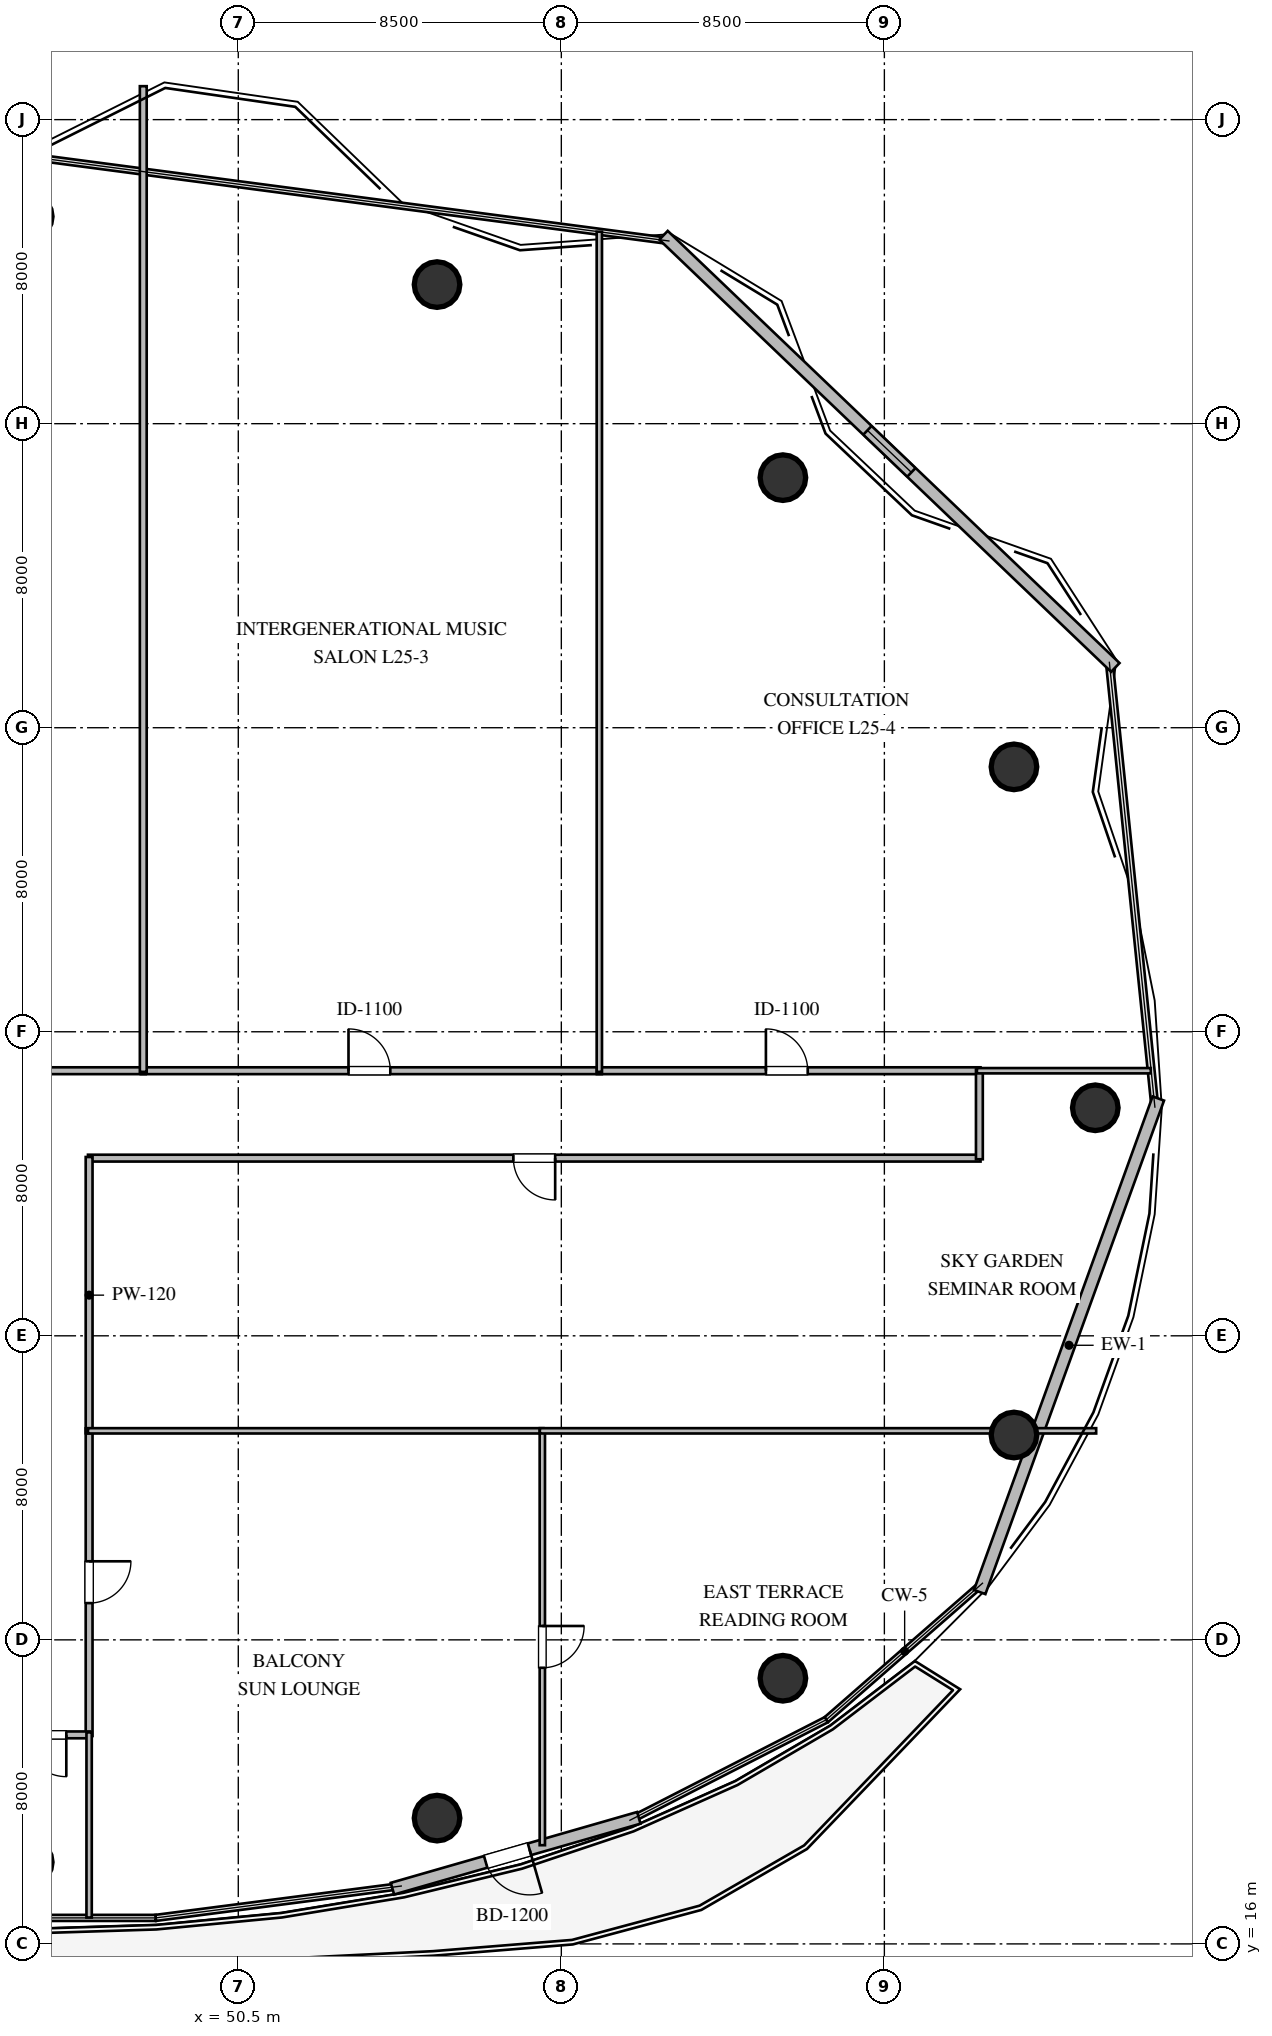
"""IFC4 building model, lengths in metres.
Left out: names, types, materials, properties, quantities, classifications, styles, units other than length and angle.
Written with IfcOpenShell. Run it as: python <this file> out.ifc"""

import sys

from ifc_helpers import new_model, si_unit, direction, frame, frame_2d, origin, origin_2d, place, context, subcontext, project, spatial, rectangle, circle, extrude, element, fill, save


model = new_model("IFC4")
c1 = context("Model", 3, precision=1e-05, world=origin(), true_north=direction((0.0, 1.0)))
c2 = subcontext(c1, "Body", "Model", "MODEL_VIEW")
j1 = project(units=[si_unit("LENGTHUNIT", "METRE"), si_unit("PLANEANGLEUNIT", "RADIAN")], contexts=[c1])
p1 = place(None, origin())
s1 = spatial("IfcSite", under=j1, at=p1, CompositionType="ELEMENT")
p2 = place(p1, origin())
s2 = spatial("IfcBuilding", under=s1, at=p2, CompositionType="ELEMENT")
p3 = place(p2, frame((0.0, 0.0, 97.8)))
s3 = spatial("IfcBuildingStorey", under=s2, at=p3, CompositionType="ELEMENT", Elevation=97.8)
for number, where, z_axis, x_axis in (
    (1, (73.05, 38.0, -0.32), (0.0, 0.0, 1.0), (1.0, 0.0, 0.0)),
    (2, (70.91, 46.97, -0.32), (0.0, 0.0, 1.0), (1.0, 0.0, 0.0)),
    (3, (64.83, 54.58, -0.32), (0.0, 0.0, 1.0), (1.0, 0.0, 0.0)),
    (4, (55.73, 59.66, -0.32), (0.0, 0.0, 1.0), (1.0, 0.0, 0.0)),
    (5, (55.73, 19.31, -0.32), (0.0, 0.0, 1.0), (1.0, 0.0, 0.0)),
    (6, (64.83, 22.99, -0.32), (0.0, 0.0, 1.0), (1.0, 0.0, 0.0)),
    (7, (70.91, 29.39, -0.32), (0.0, 0.0, 1.0), (1.0, 0.0, 0.0)),
):
    element("IfcColumn", number, at=place(p3, frame(where, z_axis=z_axis, x_axis=x_axis)), inside=s3, PredefinedType="COLUMN", context=c2, shape_type="SweptSolid", body=[
        extrude(circle(Radius=0.6, at=origin_2d()), origin(), (0.0, 0.0, 1.0), 5.12),
    ])
p4 = place(p3, frame((74.708, 38.244, 0.0), z_axis=(0.0, 0.0, 1.0), x_axis=(-0.340324669139, -0.94030799187, 0.0)))
e8 = element("IfcWall", 8, at=p4, inside=s3, PredefinedType="STANDARD", context=c2, shape_type="SweptSolid", body=[
    extrude(rectangle(XDim=13.81, YDim=0.32, at=frame_2d((6.905, 0.0))), origin(), (0.0, 0.0, 1.0), 4.56),
])
p5 = place(p3, frame((61.039, 19.317, 0.0), z_axis=(0.0, 0.0, 1.0), x_axis=(-0.96106509915, -0.276322049784, 0.0)))
e9 = element("IfcWall", 9, at=p5, inside=s3, PredefinedType="STANDARD", context=c2, shape_type="SweptSolid", body=[
    extrude(rectangle(XDim=6.746, YDim=0.32, at=frame_2d((3.373, 0.0))), origin(), (0.0, 0.0, 1.0), 4.56),
])
p6 = place(p5, frame((2.993, 0.0, 0.0)))
e10 = element("IfcOpeningElement", 10, at=p6, cuts=e9, PredefinedType="OPENING", context=c2, shape_type="SweptSolid", body=[
    extrude(rectangle(XDim=1.2, YDim=2.15, at=frame_2d((0.6, 1.075))), frame((0.0, 0.17, 0.0), z_axis=(0.0, -1.0, 0.0), x_axis=(1.0, 0.0, 0.0)), (0.0, 0.0, 1.0), 0.34),
])
p7 = place(p3, frame((61.689, 60.957, 0.0), z_axis=(0.0, 0.0, 1.0), x_axis=(0.722641212534, -0.691223319881, 0.0)))
e11 = element("IfcWall", 11, at=p7, inside=s3, PredefinedType="STANDARD", context=c2, shape_type="SweptSolid", body=[
    extrude(rectangle(XDim=16.451, YDim=0.32, at=frame_2d((8.225, 0.0))), origin(), (0.0, 0.0, 1.0), 4.56),
])
p8 = place(p7, frame((7.425, 0.0, 1.05)))
e12 = element("IfcOpeningElement", 12, at=p8, cuts=e11, PredefinedType="OPENING", context=c2, shape_type="SweptSolid", body=[
    extrude(rectangle(XDim=1.6, YDim=1.5, at=frame_2d((0.8, 0.75))), frame((0.0, 0.17, 0.0), z_axis=(0.0, -1.0, 0.0), x_axis=(1.0, 0.0, 0.0)), (0.0, 0.0, 1.0), 0.34),
])
p9 = place(p3, frame((34.935, 38.975, 0.0), z_axis=(0.0, 0.0, 1.0), x_axis=(1.0, 0.0, 0.0)))
e13 = element("IfcWall", 13, at=p9, inside=s3, PredefinedType="PARTITIONING", context=c2, shape_type="SweptSolid", body=[
    extrude(rectangle(XDim=13.13, YDim=0.18, at=frame_2d((6.565, 0.0))), origin(), (0.0, 0.0, 1.0), 4.56),
])
p10 = place(p9, frame((5.965, 0.0, 0.0)))
e14 = element("IfcOpeningElement", 14, at=p10, cuts=e13, PredefinedType="OPENING", context=c2, shape_type="SweptSolid", body=[
    extrude(rectangle(XDim=1.4, YDim=2.15, at=frame_2d((0.7, 1.075))), frame((0.0, 0.1, 0.0), z_axis=(0.0, -1.0, 0.0), x_axis=(1.0, 0.0, 0.0)), (0.0, 0.0, 1.0), 0.2),
])
p11 = place(p3, frame((47.935, 38.975, 0.0), z_axis=(0.0, 0.0, 1.0), x_axis=(1.0, 0.0, 0.0)))
e15 = element("IfcWall", 15, at=p11, inside=s3, PredefinedType="PARTITIONING", context=c2, shape_type="SweptSolid", body=[
    extrude(rectangle(XDim=12.13, YDim=0.18, at=frame_2d((6.065, 0.0))), origin(), (0.0, 0.0, 1.0), 4.56),
])
p12 = place(p11, frame((5.465, 0.0, 0.0)))
e16 = element("IfcOpeningElement", 16, at=p12, cuts=e15, PredefinedType="OPENING", context=c2, shape_type="SweptSolid", body=[
    extrude(rectangle(XDim=1.1, YDim=2.1, at=frame_2d((0.55, 1.05))), frame((0.0, 0.1, 0.0), z_axis=(0.0, -1.0, 0.0), x_axis=(1.0, 0.0, 0.0)), (0.0, 0.0, 1.0), 0.2),
])
p13 = place(p3, frame((59.935, 38.975, 0.0), z_axis=(0.0, 0.0, 1.0), x_axis=(1.0, 0.0, 0.0)))
e17 = element("IfcWall", 17, at=p13, inside=s3, PredefinedType="PARTITIONING", context=c2, shape_type="SweptSolid", body=[
    extrude(rectangle(XDim=10.095, YDim=0.18, at=frame_2d((5.047, 0.0))), origin(), (0.0, 0.0, 1.0), 4.56),
])
p14 = place(p13, frame((4.448, 0.0, 0.0)))
e18 = element("IfcOpeningElement", 18, at=p14, cuts=e17, PredefinedType="OPENING", context=c2, shape_type="SweptSolid", body=[
    extrude(rectangle(XDim=1.1, YDim=2.1, at=frame_2d((0.55, 1.05))), frame((0.0, 0.1, 0.0), z_axis=(0.0, -1.0, 0.0), x_axis=(1.0, 0.0, 0.0)), (0.0, 0.0, 1.0), 0.2),
])
p15 = place(p3, frame((46.575, 29.565, 0.0), z_axis=(0.0, 0.0, 1.0), x_axis=(0.0, -1.0, 0.0)))
e19 = element("IfcWall", 19, at=p15, inside=s3, PredefinedType="PARTITIONING", context=c2, shape_type="SweptSolid", body=[
    extrude(rectangle(XDim=8.095, YDim=0.18, at=frame_2d((4.047, 0.0))), origin(), (0.0, 0.0, 1.0), 4.56),
])
p16 = place(p15, frame((3.498, 0.0, 0.0)))
e20 = element("IfcOpeningElement", 20, at=p16, cuts=e19, PredefinedType="OPENING", context=c2, shape_type="SweptSolid", body=[
    extrude(rectangle(XDim=1.1, YDim=2.1, at=frame_2d((0.55, 1.05))), frame((0.0, 0.1, 0.0), z_axis=(0.0, -1.0, 0.0), x_axis=(1.0, 0.0, 0.0)), (0.0, 0.0, 1.0), 0.2),
])
p17 = place(p3, frame((70.03, 36.675, 0.0), z_axis=(0.0, 0.0, 1.0), x_axis=(-1.0, 0.0, 0.0)))
e21 = element("IfcWall", 21, at=p17, inside=s3, PredefinedType="PARTITIONING", context=c2, shape_type="SweptSolid", body=[
    extrude(rectangle(XDim=23.485, YDim=0.18, at=frame_2d((11.743, 0.0))), origin(), (0.0, 0.0, 1.0), 4.09),
])
p18 = place(p17, frame((11.192, 0.0, 0.0)))
e22 = element("IfcOpeningElement", 22, at=p18, cuts=e21, PredefinedType="OPENING", context=c2, shape_type="SweptSolid", body=[
    extrude(rectangle(XDim=1.1, YDim=2.1, at=frame_2d((0.55, 1.05))), frame((0.0, 0.1, 0.0), z_axis=(0.0, -1.0, 0.0), x_axis=(1.0, 0.0, 0.0)), (0.0, 0.0, 1.0), 0.2),
])
p19 = place(p3, frame((46.575, 36.705, 0.0), z_axis=(0.0, 0.0, 1.0), x_axis=(0.0, -1.0, 0.0)))
e23 = element("IfcWall", 23, at=p19, inside=s3, PredefinedType="PARTITIONING", context=c2, shape_type="SweptSolid", body=[
    extrude(rectangle(XDim=7.27, YDim=0.18, at=frame_2d((3.635, 0.0))), origin(), (0.0, 0.0, 1.0), 4.56),
])
p20 = place(p3, frame((70.0, 39.005, 0.0), z_axis=(0.0, 0.0, 1.0), x_axis=(0.0, -1.0, 0.0)))
e24 = element("IfcWall", 24, at=p20, inside=s3, PredefinedType="PARTITIONING", context=c2, shape_type="SweptSolid", body=[
    extrude(rectangle(XDim=2.36, YDim=0.18, at=frame_2d((1.18, 0.0))), origin(), (0.0, 0.0, 1.0), 4.56),
])
p21 = place(p3, frame((46.605, 21.5, 0.0), z_axis=(0.0, 0.0, 1.0), x_axis=(-1.0, 0.0, 0.0)))
e25 = element("IfcWall", 25, at=p21, inside=s3, PredefinedType="PARTITIONING", context=c2, shape_type="SweptSolid", body=[
    extrude(rectangle(XDim=2.36, YDim=0.18, at=frame_2d((1.18, 0.0))), origin(), (0.0, 0.0, 1.0), 4.56),
])
p22 = place(p21, frame((0.63, 0.0, 0.0)))
e26 = element("IfcOpeningElement", 26, at=p22, cuts=e25, PredefinedType="OPENING", context=c2, shape_type="SweptSolid", body=[
    extrude(rectangle(XDim=1.1, YDim=2.1, at=frame_2d((0.55, 1.05))), frame((0.0, 0.1, 0.0), z_axis=(0.0, -1.0, 0.0), x_axis=(1.0, 0.0, 0.0)), (0.0, 0.0, 1.0), 0.2),
])
p23 = place(p3, frame((48.0, 64.88, 0.0), z_axis=(0.0, 0.0, 1.0), x_axis=(0.0, -1.0, 0.0)))
e27 = element("IfcWall", 27, at=p23, inside=s3, PredefinedType="PARTITIONING", context=c2, shape_type="SweptSolid", body=[
    extrude(rectangle(XDim=25.935, YDim=0.18, at=frame_2d((12.967, 0.0))), origin(), (0.0, 0.0, 1.0), 4.56),
])
p24 = place(p3, frame((60.0, 61.052, 0.0), z_axis=(0.0, 0.0, 1.0), x_axis=(0.0, -1.0, 0.0)))
e28 = element("IfcWall", 28, at=p24, inside=s3, PredefinedType="PARTITIONING", context=c2, shape_type="SweptSolid", body=[
    extrude(rectangle(XDim=22.107, YDim=0.14, at=frame_2d((11.053, 0.0))), origin(), (0.0, 0.0, 1.0), 4.196),
])
p25 = place(p3, frame((74.51, 38.975, 0.0), z_axis=(0.0, 0.0, 1.0), x_axis=(-1.0, 0.0, 0.0)))
e29 = element("IfcWall", 29, at=p25, inside=s3, PredefinedType="PARTITIONING", context=c2, shape_type="SweptSolid", body=[
    extrude(rectangle(XDim=4.575, YDim=0.14, at=frame_2d((2.288, 0.0))), origin(), (0.0, 0.0, 1.0), 4.56),
])
p26 = place(p3, frame((46.545, 29.5, 0.0), z_axis=(0.0, 0.0, 1.0), x_axis=(1.0, 0.0, 0.0)))
e30 = element("IfcWall", 30, at=p26, inside=s3, PredefinedType="PARTITIONING", context=c2, shape_type="SweptSolid", body=[
    extrude(rectangle(XDim=11.985, YDim=0.14, at=frame_2d((5.993, 0.0))), origin(), (0.0, 0.0, 1.0), 4.56),
])
p27 = place(p3, frame((58.5, 29.53, 0.0), z_axis=(0.0, 0.0, 1.0), x_axis=(0.0, -1.0, 0.0)))
e31 = element("IfcWall", 31, at=p27, inside=s3, PredefinedType="PARTITIONING", context=c2, shape_type="SweptSolid", body=[
    extrude(rectangle(XDim=10.933, YDim=0.14, at=frame_2d((5.467, 0.0))), origin(), (0.0, 0.0, 1.0), 4.196),
])
p28 = place(p27, frame((5.165, 0.0, 0.0)))
e32 = element("IfcOpeningElement", 32, at=p28, cuts=e31, PredefinedType="OPENING", context=c2, shape_type="SweptSolid", body=[
    extrude(rectangle(XDim=1.1, YDim=2.1, at=frame_2d((0.55, 1.05))), frame((0.0, 0.08, 0.0), z_axis=(0.0, -1.0, 0.0), x_axis=(1.0, 0.0, 0.0)), (0.0, 0.0, 1.0), 0.16),
])
p29 = place(p3, frame((46.575, 16.694, 0.0), z_axis=(0.0, 0.0, 1.0), x_axis=(0.0, 1.0, 0.0)))
e33 = element("IfcWall", 33, at=p29, inside=s3, PredefinedType="PARTITIONING", context=c2, shape_type="SweptSolid", body=[
    extrude(rectangle(XDim=4.871, YDim=0.14, at=frame_2d((2.436, 0.0))), origin(), (0.0, 0.0, 1.0), 4.56),
])
p30 = place(p3, frame((73.073, 29.5, 0.0), z_axis=(0.0, 0.0, 1.0), x_axis=(-1.0, 0.0, 0.0)))
e34 = element("IfcWall", 34, at=p30, inside=s3, PredefinedType="PARTITIONING", context=c2, shape_type="SweptSolid", body=[
    extrude(rectangle(XDim=14.638, YDim=0.14, at=frame_2d((7.319, 0.0))), origin(), (0.0, 0.0, 1.0), 4.09),
])
p31 = place(p6, origin())
e35 = element("IfcDoor", 35, at=p31, inside=s3, OperationType="SINGLE_SWING_LEFT", PredefinedType="DOOR", context=c2, shape_type="SweptSolid", body=[
    extrude(rectangle(XDim=1.2, YDim=2.15, at=frame_2d((0.6, 1.075))), frame((0.0, 0.025, 0.0), z_axis=(0.0, -1.0, 0.0), x_axis=(1.0, 0.0, 0.0)), (0.0, 0.0, 1.0), 0.05),
])
fill(e10, e35)
p32 = place(p8, origin())
e36 = element("IfcWindow", 36, at=p32, inside=s3, PartitioningType="SINGLE_PANEL", PredefinedType="WINDOW", context=c2, shape_type="SweptSolid", body=[
    extrude(rectangle(XDim=1.6, YDim=1.5, at=frame_2d((0.8, 0.75))), frame((0.0, 0.03, 0.0), z_axis=(0.0, -1.0, 0.0), x_axis=(1.0, 0.0, 0.0)), (0.0, 0.0, 1.0), 0.06),
])
fill(e12, e36)
p33 = place(p12, origin())
e37 = element("IfcDoor", 37, at=p33, inside=s3, OperationType="SINGLE_SWING_LEFT", PredefinedType="DOOR", context=c2, shape_type="SweptSolid", body=[
    extrude(rectangle(XDim=1.1, YDim=2.1, at=frame_2d((0.55, 1.05))), frame((0.0, 0.025, 0.0), z_axis=(0.0, -1.0, 0.0), x_axis=(1.0, 0.0, 0.0)), (0.0, 0.0, 1.0), 0.05),
])
fill(e16, e37)
p34 = place(p14, origin())
e38 = element("IfcDoor", 38, at=p34, inside=s3, OperationType="SINGLE_SWING_LEFT", PredefinedType="DOOR", context=c2, shape_type="SweptSolid", body=[
    extrude(rectangle(XDim=1.1, YDim=2.1, at=frame_2d((0.55, 1.05))), frame((0.0, 0.025, 0.0), z_axis=(0.0, -1.0, 0.0), x_axis=(1.0, 0.0, 0.0)), (0.0, 0.0, 1.0), 0.05),
])
fill(e18, e38)
p35 = place(p16, origin())
e39 = element("IfcDoor", 39, at=p35, inside=s3, OperationType="SINGLE_SWING_LEFT", PredefinedType="DOOR", context=c2, shape_type="SweptSolid", body=[
    extrude(rectangle(XDim=1.1, YDim=2.1, at=frame_2d((0.55, 1.05))), frame((0.0, 0.025, 0.0), z_axis=(0.0, -1.0, 0.0), x_axis=(1.0, 0.0, 0.0)), (0.0, 0.0, 1.0), 0.05),
])
fill(e20, e39)
p36 = place(p18, origin())
e40 = element("IfcDoor", 40, at=p36, inside=s3, OperationType="SINGLE_SWING_LEFT", PredefinedType="DOOR", context=c2, shape_type="SweptSolid", body=[
    extrude(rectangle(XDim=1.1, YDim=2.1, at=frame_2d((0.55, 1.05))), frame((0.0, 0.025, 0.0), z_axis=(0.0, -1.0, 0.0), x_axis=(1.0, 0.0, 0.0)), (0.0, 0.0, 1.0), 0.05),
])
fill(e22, e40)
p37 = place(p22, origin())
e41 = element("IfcDoor", 41, at=p37, inside=s3, OperationType="SINGLE_SWING_LEFT", PredefinedType="DOOR", context=c2, shape_type="SweptSolid", body=[
    extrude(rectangle(XDim=1.1, YDim=2.1, at=frame_2d((0.55, 1.05))), frame((0.0, 0.025, 0.0), z_axis=(0.0, -1.0, 0.0), x_axis=(1.0, 0.0, 0.0)), (0.0, 0.0, 1.0), 0.05),
])
fill(e26, e41)
p38 = place(p28, origin())
e42 = element("IfcDoor", 42, at=p38, inside=s3, OperationType="SINGLE_SWING_LEFT", PredefinedType="DOOR", context=c2, shape_type="SweptSolid", body=[
    extrude(rectangle(XDim=1.1, YDim=2.1, at=frame_2d((0.55, 1.05))), frame((0.0, 0.025, 0.0), z_axis=(0.0, -1.0, 0.0), x_axis=(1.0, 0.0, 0.0)), (0.0, 0.0, 1.0), 0.05),
])
fill(e32, e42)
save(model, sys.argv[1])
